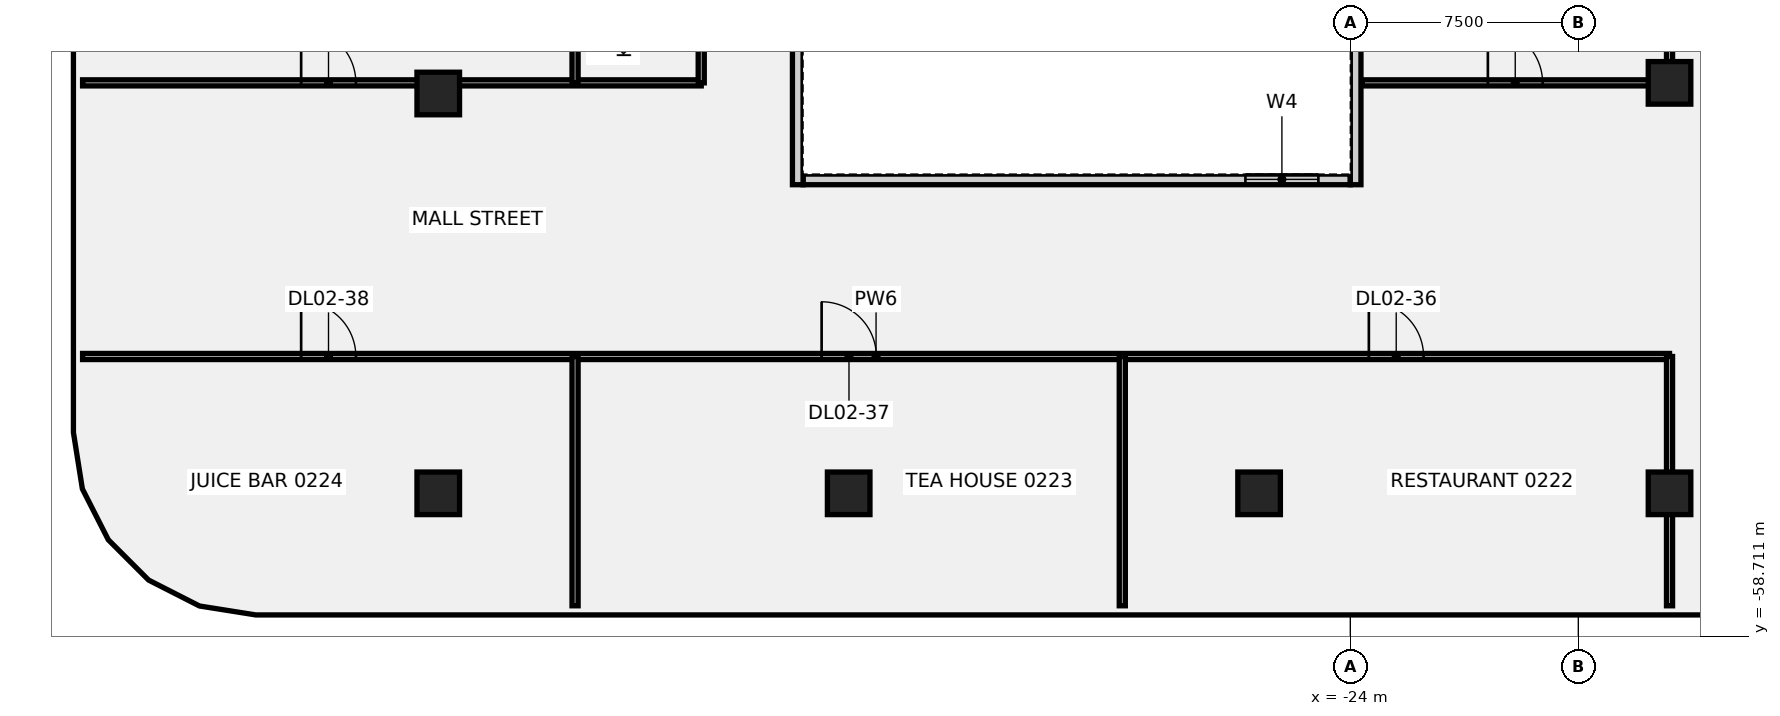
"""IFC4 building model, lengths in metres.
Left out: names, types, materials, properties, quantities, classifications, styles, units other than length and angle.
Written with IfcOpenShell. Run it as: python <this file> out.ifc"""

import sys

from ifc_helpers import new_model, si_unit, direction, frame, frame_2d, origin, origin_2d, place, context, subcontext, project, spatial, rectangle, extrude, element, fill, save


model = new_model("IFC4")
c1 = context("Model", 3, precision=1e-05, world=origin(), true_north=direction((0.0, 1.0)))
c2 = subcontext(c1, "Body", "Model", "MODEL_VIEW")
j1 = project(units=[si_unit("LENGTHUNIT", "METRE"), si_unit("PLANEANGLEUNIT", "RADIAN")], contexts=[c1])
p1 = place(None, origin())
s1 = spatial("IfcSite", under=j1, at=p1, CompositionType="ELEMENT")
p2 = place(p1, origin())
s2 = spatial("IfcBuilding", under=s1, at=p2, CompositionType="ELEMENT")
p3 = place(p2, frame((0.0, 0.0, 15.0)))
s3 = spatial("IfcBuildingStorey", under=s2, at=p3, CompositionType="ELEMENT", Elevation=15.0)
for number, where, z_axis, x_axis in (
    (1, (-54.0, -54.0, -0.5), (0.0, 0.0, 1.0), (1.0, 0.0, 0.0)),
    (2, (-54.0, -40.85, -0.5), (0.0, 0.0, 1.0), (1.0, 0.0, 0.0)),
    (3, (-40.5, -54.0, -0.5), (0.0, 0.0, 1.0), (1.0, 0.0, 0.0)),
    (4, (-27.0, -54.0, -0.5), (0.0, 0.0, 1.0), (1.0, 0.0, 0.0)),
    (5, (-13.5, -54.0, -0.5), (0.0, 0.0, 1.0), (1.0, 0.0, 0.0)),
    (6, (-13.5, -40.5, -0.5), (0.0, 0.0, 1.0), (1.0, 0.0, 0.0)),
):
    element("IfcColumn", number, at=place(p3, frame(where, z_axis=z_axis, x_axis=x_axis)), inside=s3, PredefinedType="COLUMN", context=c2, shape_type="SweptSolid", body=[
        extrude(rectangle(XDim=1.4, YDim=1.4, at=origin_2d()), origin(), (0.0, 0.0, 1.0), 5.0),
    ])
p4 = place(p3, frame((-65.699, -49.5, 0.0), z_axis=(0.0, 0.0, 1.0), x_axis=(1.0, 0.0, 0.0)))
e7 = element("IfcWall", 7, at=p4, inside=s3, PredefinedType="PARTITIONING", context=c2, shape_type="SweptSolid", body=[
    extrude(rectangle(XDim=52.199, YDim=0.2, at=frame_2d((26.1, 0.0))), origin(), (0.0, 0.0, 1.0), 4.5),
])
p5 = place(p4, frame((42.309, 0.0, 0.0)))
e8 = element("IfcOpeningElement", 8, at=p5, cuts=e7, PredefinedType="OPENING", context=c2, shape_type="SweptSolid", body=[
    extrude(rectangle(XDim=1.8, YDim=2.1, at=frame_2d((0.9, 1.05))), frame((0.0, 0.11, 0.0), z_axis=(0.0, -1.0, 0.0), x_axis=(1.0, 0.0, 0.0)), (0.0, 0.0, 1.0), 0.22),
])
p6 = place(p4, frame((24.309, 0.0, 0.0)))
e9 = element("IfcOpeningElement", 9, at=p6, cuts=e7, PredefinedType="OPENING", context=c2, shape_type="SweptSolid", body=[
    extrude(rectangle(XDim=1.8, YDim=2.1, at=frame_2d((0.9, 1.05))), frame((0.0, 0.11, 0.0), z_axis=(0.0, -1.0, 0.0), x_axis=(1.0, 0.0, 0.0)), (0.0, 0.0, 1.0), 0.22),
])
p7 = place(p4, frame((7.189, 0.0, 0.0)))
e10 = element("IfcOpeningElement", 10, at=p7, cuts=e7, PredefinedType="OPENING", context=c2, shape_type="SweptSolid", body=[
    extrude(rectangle(XDim=1.8, YDim=2.1, at=frame_2d((0.9, 1.05))), frame((0.0, 0.11, 0.0), z_axis=(0.0, -1.0, 0.0), x_axis=(1.0, 0.0, 0.0)), (0.0, 0.0, 1.0), 0.22),
])
p8 = place(p3, frame((-65.699, -40.5, 0.0), z_axis=(0.0, 0.0, 1.0), x_axis=(1.0, 0.0, 0.0)))
e11 = element("IfcWall", 11, at=p8, inside=s3, PredefinedType="PARTITIONING", context=c2, shape_type="SweptSolid", body=[
    extrude(rectangle(XDim=20.349, YDim=0.2, at=frame_2d((10.174, 0.0))), origin(), (0.0, 0.0, 1.0), 4.5),
])
p9 = place(p8, frame((7.189, 0.0, 0.0)))
e12 = element("IfcOpeningElement", 12, at=p9, cuts=e11, PredefinedType="OPENING", context=c2, shape_type="SweptSolid", body=[
    extrude(rectangle(XDim=1.8, YDim=2.1, at=frame_2d((0.9, 1.05))), frame((0.0, 0.11, 0.0), z_axis=(0.0, -1.0, 0.0), x_axis=(1.0, 0.0, 0.0)), (0.0, 0.0, 1.0), 0.22),
])
p10 = place(p3, frame((-49.5, -57.699, 0.0), z_axis=(0.0, 0.0, 1.0), x_axis=(0.0, 1.0, 0.0)))
e13 = element("IfcWall", 13, at=p10, inside=s3, PredefinedType="PARTITIONING", context=c2, shape_type="SweptSolid", body=[
    extrude(rectangle(XDim=8.199, YDim=0.2, at=frame_2d((4.1, 0.0))), origin(), (0.0, 0.0, 1.0), 4.5),
])
p11 = place(p3, frame((-45.35, -40.5, 0.0), z_axis=(0.0, 0.0, 1.0), x_axis=(0.0, 1.0, 0.0)))
e14 = element("IfcWall", 14, at=p11, inside=s3, PredefinedType="PARTITIONING", context=c2, shape_type="SweptSolid", body=[
    extrude(rectangle(XDim=9.0, YDim=0.2, at=frame_2d((4.5, 0.0))), origin(), (0.0, 0.0, 1.0), 4.5),
])
p12 = place(p11, frame((3.6, 0.0, 0.0)))
e15 = element("IfcOpeningElement", 15, at=p12, cuts=e14, PredefinedType="OPENING", context=c2, shape_type="SweptSolid", body=[
    extrude(rectangle(XDim=1.8, YDim=2.1, at=frame_2d((0.9, 1.05))), frame((0.0, 0.11, 0.0), z_axis=(0.0, -1.0, 0.0), x_axis=(1.0, 0.0, 0.0)), (0.0, 0.0, 1.0), 0.22),
])
p13 = place(p3, frame((-49.5, -40.5, 0.0), z_axis=(0.0, 0.0, 1.0), x_axis=(0.0, 1.0, 0.0)))
e16 = element("IfcWall", 16, at=p13, inside=s3, PredefinedType="PARTITIONING", context=c2, shape_type="SweptSolid", body=[
    extrude(rectangle(XDim=9.0, YDim=0.2, at=frame_2d((4.5, 0.0))), origin(), (0.0, 0.0, 1.0), 4.5),
])
for number, where, z_axis, x_axis in (
    (17, (-31.5, -57.699, 0.0), (0.0, 0.0, 1.0), (0.0, 1.0, 0.0)),
    (18, (-13.5, -57.699, 0.0), (0.0, 0.0, 1.0), (0.0, 1.0, 0.0)),
):
    element("IfcWall", number, at=place(p3, frame(where, z_axis=z_axis, x_axis=x_axis)), inside=s3, PredefinedType="PARTITIONING", context=c2, shape_type="SweptSolid", body=[
        extrude(rectangle(XDim=8.199, YDim=0.2, at=frame_2d((4.1, 0.0))), origin(), (0.0, 0.0, 1.0), 4.5),
    ])
p14 = place(p3, frame((-13.5, -40.5, 0.0), z_axis=(0.0, 0.0, 1.0), x_axis=(0.0, 1.0, 0.0)))
e19 = element("IfcWall", 19, at=p14, inside=s3, PredefinedType="PARTITIONING", context=c2, shape_type="SweptSolid", body=[
    extrude(rectangle(XDim=5.07, YDim=0.2, at=frame_2d((2.535, 0.0))), origin(), (0.0, 0.0, 1.0), 4.5),
])
p15 = place(p3, frame((-23.62, -40.5, 0.0), z_axis=(0.0, 0.0, 1.0), x_axis=(1.0, 0.0, 0.0)))
e20 = element("IfcWall", 20, at=p15, inside=s3, PredefinedType="PARTITIONING", context=c2, shape_type="SweptSolid", body=[
    extrude(rectangle(XDim=10.12, YDim=0.2, at=frame_2d((5.06, 0.0))), origin(), (0.0, 0.0, 1.0), 4.5),
])
p16 = place(p15, frame((4.145, 0.0, 0.0)))
e21 = element("IfcOpeningElement", 21, at=p16, cuts=e20, PredefinedType="OPENING", context=c2, shape_type="SweptSolid", body=[
    extrude(rectangle(XDim=1.8, YDim=2.1, at=frame_2d((0.9, 1.05))), frame((0.0, 0.11, 0.0), z_axis=(0.0, -1.0, 0.0), x_axis=(1.0, 0.0, 0.0)), (0.0, 0.0, 1.0), 0.22),
])
p17 = place(p3, frame((-42.0, -43.675, 0.0), z_axis=(0.0, 0.0, 1.0), x_axis=(1.0, 0.0, 0.0)))
e22 = element("IfcWall", 22, at=p17, inside=s3, PredefinedType="SOLIDWALL", context=c2, shape_type="SweptSolid", body=[
    extrude(rectangle(XDim=18.0, YDim=0.35, at=frame_2d((9.0, 0.0))), origin(), (0.0, 0.0, 1.0), 4.5),
])
p18 = place(p17, frame((14.55, 0.0, 1.0)))
e23 = element("IfcOpeningElement", 23, at=p18, cuts=e22, PredefinedType="OPENING", context=c2, shape_type="SweptSolid", body=[
    extrude(rectangle(XDim=2.4, YDim=1.8, at=frame_2d((1.2, 0.9))), frame((0.0, 0.185, 0.0), z_axis=(0.0, -1.0, 0.0), x_axis=(1.0, 0.0, 0.0)), (0.0, 0.0, 1.0), 0.37),
])
p19 = place(p3, frame((-42.175, -43.85, 0.0), z_axis=(0.0, 0.0, 1.0), x_axis=(0.0, 1.0, 0.0)))
e24 = element("IfcWall", 24, at=p19, inside=s3, PredefinedType="SOLIDWALL", context=c2, shape_type="SweptSolid", body=[
    extrude(rectangle(XDim=27.4, YDim=0.35, at=frame_2d((13.7, 0.0))), origin(), (0.0, 0.0, 1.0), 4.5),
])
p20 = place(p19, frame((14.9, 0.0, 1.0)))
e25 = element("IfcOpeningElement", 25, at=p20, cuts=e24, PredefinedType="OPENING", context=c2, shape_type="SweptSolid", body=[
    extrude(rectangle(XDim=2.4, YDim=1.8, at=frame_2d((1.2, 0.9))), frame((0.0, 0.185, 0.0), z_axis=(0.0, -1.0, 0.0), x_axis=(1.0, 0.0, 0.0)), (0.0, 0.0, 1.0), 0.37),
])
p21 = place(p3, frame((-23.825, -43.85, 0.0), z_axis=(0.0, 0.0, 1.0), x_axis=(0.0, 1.0, 0.0)))
e26 = element("IfcWall", 26, at=p21, inside=s3, PredefinedType="SOLIDWALL", context=c2, shape_type="SweptSolid", body=[
    extrude(rectangle(XDim=27.4, YDim=0.35, at=frame_2d((13.7, 0.0))), origin(), (0.0, 0.0, 1.0), 4.5),
])
p22 = place(p21, frame((14.9, 0.0, 1.0)))
e27 = element("IfcOpeningElement", 27, at=p22, cuts=e26, PredefinedType="OPENING", context=c2, shape_type="SweptSolid", body=[
    extrude(rectangle(XDim=2.4, YDim=1.8, at=frame_2d((1.2, 0.9))), frame((0.0, 0.185, 0.0), z_axis=(0.0, -1.0, 0.0), x_axis=(1.0, 0.0, 0.0)), (0.0, 0.0, 1.0), 0.37),
])
p23 = place(p16, origin())
e28 = element("IfcDoor", 28, at=p23, inside=s3, OperationType="SINGLE_SWING_RIGHT", PredefinedType="DOOR", context=c2, shape_type="SweptSolid", body=[
    extrude(rectangle(XDim=1.8, YDim=2.1, at=frame_2d((0.9, 1.05))), frame((0.0, 0.025, 0.0), z_axis=(0.0, -1.0, 0.0), x_axis=(1.0, 0.0, 0.0)), (0.0, 0.0, 1.0), 0.05),
])
fill(e21, e28)
p24 = place(p9, origin())
e29 = element("IfcDoor", 29, at=p24, inside=s3, OperationType="SINGLE_SWING_LEFT", PredefinedType="DOOR", context=c2, shape_type="SweptSolid", body=[
    extrude(rectangle(XDim=1.8, YDim=2.1, at=frame_2d((0.9, 1.05))), frame((0.0, 0.025, 0.0), z_axis=(0.0, -1.0, 0.0), x_axis=(1.0, 0.0, 0.0)), (0.0, 0.0, 1.0), 0.05),
])
fill(e12, e29)
p25 = place(p5, origin())
e30 = element("IfcDoor", 30, at=p25, inside=s3, OperationType="SINGLE_SWING_RIGHT", PredefinedType="DOOR", context=c2, shape_type="SweptSolid", body=[
    extrude(rectangle(XDim=1.8, YDim=2.1, at=frame_2d((0.9, 1.05))), frame((0.0, 0.025, 0.0), z_axis=(0.0, -1.0, 0.0), x_axis=(1.0, 0.0, 0.0)), (0.0, 0.0, 1.0), 0.05),
])
fill(e8, e30)
p26 = place(p6, origin())
e31 = element("IfcDoor", 31, at=p26, inside=s3, OperationType="SINGLE_SWING_LEFT", PredefinedType="DOOR", context=c2, shape_type="SweptSolid", body=[
    extrude(rectangle(XDim=1.8, YDim=2.1, at=frame_2d((0.9, 1.05))), frame((0.0, 0.025, 0.0), z_axis=(0.0, -1.0, 0.0), x_axis=(1.0, 0.0, 0.0)), (0.0, 0.0, 1.0), 0.05),
])
fill(e9, e31)
p27 = place(p7, origin())
e32 = element("IfcDoor", 32, at=p27, inside=s3, OperationType="SINGLE_SWING_RIGHT", PredefinedType="DOOR", context=c2, shape_type="SweptSolid", body=[
    extrude(rectangle(XDim=1.8, YDim=2.1, at=frame_2d((0.9, 1.05))), frame((0.0, 0.025, 0.0), z_axis=(0.0, -1.0, 0.0), x_axis=(1.0, 0.0, 0.0)), (0.0, 0.0, 1.0), 0.05),
])
fill(e10, e32)
p28 = place(p18, origin())
e33 = element("IfcWindow", 33, at=p28, inside=s3, PartitioningType="SINGLE_PANEL", PredefinedType="WINDOW", context=c2, shape_type="SweptSolid", body=[
    extrude(rectangle(XDim=2.4, YDim=1.8, at=frame_2d((1.2, 0.9))), frame((0.0, 0.03, 0.0), z_axis=(0.0, -1.0, 0.0), x_axis=(1.0, 0.0, 0.0)), (0.0, 0.0, 1.0), 0.06),
])
fill(e23, e33)
save(model, sys.argv[1])
